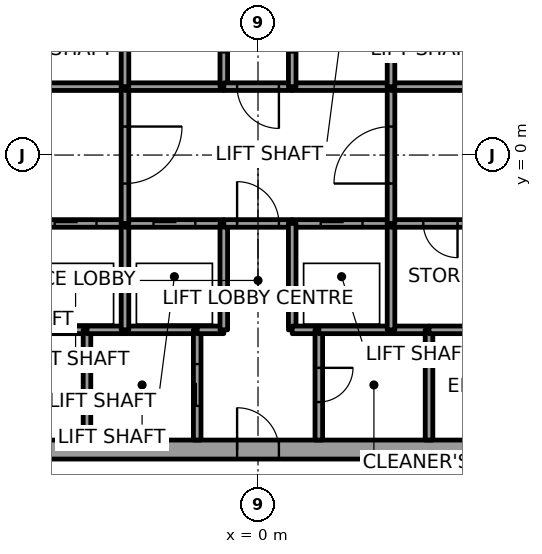
"""IFC4 building model, lengths in metres.
Left out: names, types, materials, properties, quantities, classifications, styles, units other than length and angle.
Written with IfcOpenShell. Run it as: python <this file> out.ifc"""

import sys

from ifc_helpers import new_model, si_unit, direction, frame, frame_2d, origin, place, context, subcontext, project, spatial, rectangle, extrude, element, fill, save


model = new_model("IFC4")
c1 = context("Model", 3, precision=1e-05, world=origin(), true_north=direction((0.0, 1.0)))
c2 = subcontext(c1, "Body", "Model", "MODEL_VIEW")
j1 = project(units=[si_unit("LENGTHUNIT", "METRE"), si_unit("PLANEANGLEUNIT", "RADIAN")], contexts=[c1])
p1 = place(None, origin())
s1 = spatial("IfcSite", under=j1, at=p1, CompositionType="ELEMENT")
p2 = place(p1, origin())
s2 = spatial("IfcBuilding", under=s1, at=p2, CompositionType="ELEMENT")
p3 = place(p2, frame((0.0, 0.0, 22.2)))
s3 = spatial("IfcBuildingStorey", under=s2, at=p3, CompositionType="ELEMENT", Elevation=22.2)
p4 = place(p3, frame((-11.0, -7.75, 0.0), z_axis=(0.0, 0.0, 1.0), x_axis=(1.0, 0.0, 0.0)))
e1 = element("IfcWall", 1, at=p4, inside=s3, PredefinedType="SHEAR", context=c2, shape_type="SweptSolid", body=[
    extrude(rectangle(XDim=22.0, YDim=0.5, at=frame_2d((11.0, 0.0))), origin(), (0.0, 0.0, 1.0), 6.6),
])
p5 = place(p4, frame((10.45, 0.0, 0.0)))
e2 = element("IfcOpeningElement", 2, at=p5, cuts=e1, PredefinedType="OPENING", context=c2, shape_type="SweptSolid", body=[
    extrude(rectangle(XDim=1.1, YDim=2.1, at=frame_2d((0.55, 1.05))), frame((0.0, 0.25, 0.0), z_axis=(0.0, -1.0, 0.0), x_axis=(1.0, 0.0, 0.0)), (0.0, 0.0, 1.0), 0.5),
])
p6 = place(p3, frame((-6.1, -4.6, 0.0), z_axis=(0.0, 0.0, 1.0), x_axis=(1.0, 0.0, 0.0)))
e3 = element("IfcWall", 3, at=p6, inside=s3, PredefinedType="SOLIDWALL", context=c2, shape_type="SweptSolid", body=[
    extrude(rectangle(XDim=1.6, YDim=0.2, at=frame_2d((0.8, 0.0))), origin(), (0.0, 0.0, 1.0), 6.35),
])
p7 = place(p3, frame((-6.1, -1.8, 0.0), z_axis=(0.0, 0.0, 1.0), x_axis=(1.0, 0.0, 0.0)))
e4 = element("IfcWall", 4, at=p7, inside=s3, PredefinedType="SOLIDWALL", context=c2, shape_type="SweptSolid", body=[
    extrude(rectangle(XDim=2.6, YDim=0.2, at=frame_2d((1.3, 0.0))), origin(), (0.0, 0.0, 1.0), 6.35),
])
p8 = place(p7, frame((0.75, 0.0, 0.0)))
e5 = element("IfcOpeningElement", 5, at=p8, cuts=e4, PredefinedType="OPENING", context=c2, shape_type="SweptSolid", body=[
    extrude(rectangle(XDim=1.1, YDim=2.1, at=frame_2d((0.55, 1.05))), frame((0.0, 0.1, 0.0), z_axis=(0.0, -1.0, 0.0), x_axis=(1.0, 0.0, 0.0)), (0.0, 0.0, 1.0), 0.2),
])
p9 = place(p3, frame((-3.5, 1.8, 0.0), z_axis=(0.0, 0.0, 1.0), x_axis=(-1.0, 0.0, 0.0)))
e6 = element("IfcWall", 6, at=p9, inside=s3, PredefinedType="SOLIDWALL", context=c2, shape_type="SweptSolid", body=[
    extrude(rectangle(XDim=2.6, YDim=0.2, at=frame_2d((1.3, 0.0))), origin(), (0.0, 0.0, 1.0), 6.35),
])
p10 = place(p3, frame((-4.5, -4.6, 0.0), z_axis=(0.0, 0.0, 1.0), x_axis=(0.0, -1.0, 0.0)))
e7 = element("IfcWall", 7, at=p10, inside=s3, PredefinedType="SOLIDWALL", context=c2, shape_type="SweptSolid", body=[
    extrude(rectangle(XDim=2.9, YDim=0.2, at=frame_2d((1.45, 0.0))), origin(), (0.0, 0.0, 1.0), 6.35),
])
p11 = place(p3, frame((-4.5, -4.6, 0.0), z_axis=(0.0, 0.0, 1.0), x_axis=(1.0, 0.0, 0.0)))
e8 = element("IfcWall", 8, at=p11, inside=s3, PredefinedType="SOLIDWALL", context=c2, shape_type="SweptSolid", body=[
    extrude(rectangle(XDim=1.0, YDim=0.2, at=frame_2d((0.5, 0.0))), origin(), (0.0, 0.0, 1.0), 6.35),
])
p12 = place(p3, frame((-3.5, -4.6, 0.0), z_axis=(0.0, 0.0, 1.0), x_axis=(1.0, 0.0, 0.0)))
e9 = element("IfcWall", 9, at=p12, inside=s3, PredefinedType="SOLIDWALL", context=c2, shape_type="SweptSolid", body=[
    extrude(rectangle(XDim=1.9, YDim=0.2, at=frame_2d((0.95, 0.0))), origin(), (0.0, 0.0, 1.0), 6.35),
])
p13 = place(p3, frame((-3.5, -4.6, 0.0), z_axis=(0.0, 0.0, 1.0), x_axis=(0.0, 1.0, 0.0)))
e10 = element("IfcWall", 10, at=p13, inside=s3, PredefinedType="SOLIDWALL", context=c2, shape_type="SweptSolid", body=[
    extrude(rectangle(XDim=2.8, YDim=0.2, at=frame_2d((1.4, 0.0))), origin(), (0.0, 0.0, 1.0), 6.35),
])
p14 = place(p3, frame((-3.5, -1.8, 0.0), z_axis=(0.0, 0.0, 1.0), x_axis=(1.0, 0.0, 0.0)))
e11 = element("IfcWall", 11, at=p14, inside=s3, PredefinedType="SOLIDWALL", context=c2, shape_type="SweptSolid", body=[
    extrude(rectangle(XDim=2.6, YDim=0.2, at=frame_2d((1.3, 0.0))), origin(), (0.0, 0.0, 1.0), 6.35),
])
p15 = place(p14, frame((0.75, 0.0, 0.0)))
e12 = element("IfcOpeningElement", 12, at=p15, cuts=e11, PredefinedType="OPENING", context=c2, shape_type="SweptSolid", body=[
    extrude(rectangle(XDim=1.1, YDim=2.1, at=frame_2d((0.55, 1.05))), frame((0.0, 0.1, 0.0), z_axis=(0.0, -1.0, 0.0), x_axis=(1.0, 0.0, 0.0)), (0.0, 0.0, 1.0), 0.2),
])
p16 = place(p3, frame((-3.5, 1.8, 0.0), z_axis=(0.0, 0.0, 1.0), x_axis=(0.0, -1.0, 0.0)))
e13 = element("IfcWall", 13, at=p16, inside=s3, PredefinedType="SOLIDWALL", context=c2, shape_type="SweptSolid", body=[
    extrude(rectangle(XDim=3.6, YDim=0.2, at=frame_2d((1.8, 0.0))), origin(), (0.0, 0.0, 1.0), 6.35),
])
p17 = place(p16, frame((1.05, 0.0, 0.0)))
e14 = element("IfcOpeningElement", 14, at=p17, cuts=e13, PredefinedType="OPENING", context=c2, shape_type="SweptSolid", body=[
    extrude(rectangle(XDim=1.5, YDim=2.4, at=frame_2d((0.75, 1.2))), frame((0.0, 0.1, 0.0), z_axis=(0.0, -1.0, 0.0), x_axis=(1.0, 0.0, 0.0)), (0.0, 0.0, 1.0), 0.2),
])
p18 = place(p3, frame((-0.9, 1.8, 0.0), z_axis=(0.0, 0.0, 1.0), x_axis=(-1.0, 0.0, 0.0)))
e15 = element("IfcWall", 15, at=p18, inside=s3, PredefinedType="SOLIDWALL", context=c2, shape_type="SweptSolid", body=[
    extrude(rectangle(XDim=2.6, YDim=0.2, at=frame_2d((1.3, 0.0))), origin(), (0.0, 0.0, 1.0), 6.35),
])
p19 = place(p3, frame((-3.5, 4.6, 0.0), z_axis=(0.0, 0.0, 1.0), x_axis=(0.0, -1.0, 0.0)))
e16 = element("IfcWall", 16, at=p19, inside=s3, PredefinedType="SOLIDWALL", context=c2, shape_type="SweptSolid", body=[
    extrude(rectangle(XDim=2.8, YDim=0.2, at=frame_2d((1.4, 0.0))), origin(), (0.0, 0.0, 1.0), 6.35),
])
p20 = place(p3, frame((-0.9, 1.8, 0.0), z_axis=(0.0, 0.0, 1.0), x_axis=(0.0, 1.0, 0.0)))
e17 = element("IfcWall", 17, at=p20, inside=s3, PredefinedType="SOLIDWALL", context=c2, shape_type="SweptSolid", body=[
    extrude(rectangle(XDim=3.0, YDim=0.2, at=frame_2d((1.5, 0.0))), origin(), (0.0, 0.0, 1.0), 6.35),
])
p21 = place(p20, frame((0.9, 0.0, 0.0)))
e18 = element("IfcOpeningElement", 18, at=p21, cuts=e17, PredefinedType="OPENING", context=c2, shape_type="SweptSolid", body=[
    extrude(rectangle(XDim=1.2, YDim=2.1, at=frame_2d((0.6, 1.05))), frame((0.0, 0.1, 0.0), z_axis=(0.0, -1.0, 0.0), x_axis=(1.0, 0.0, 0.0)), (0.0, 0.0, 1.0), 0.2),
])
p22 = place(p3, frame((-1.6, -7.5, 0.0), z_axis=(0.0, 0.0, 1.0), x_axis=(0.0, 1.0, 0.0)))
e19 = element("IfcWall", 19, at=p22, inside=s3, PredefinedType="SOLIDWALL", context=c2, shape_type="SweptSolid", body=[
    extrude(rectangle(XDim=2.9, YDim=0.2, at=frame_2d((1.45, 0.0))), origin(), (0.0, 0.0, 1.0), 6.35),
])
p23 = place(p22, frame((0.9, 0.0, 0.0)))
e20 = element("IfcOpeningElement", 20, at=p23, cuts=e19, PredefinedType="OPENING", context=c2, shape_type="SweptSolid", body=[
    extrude(rectangle(XDim=1.1, YDim=2.1, at=frame_2d((0.55, 1.05))), frame((0.0, 0.1, 0.0), z_axis=(0.0, -1.0, 0.0), x_axis=(1.0, 0.0, 0.0)), (0.0, 0.0, 1.0), 0.2),
])
p24 = place(p3, frame((-1.6, -4.6, 0.0), z_axis=(0.0, 0.0, 1.0), x_axis=(1.0, 0.0, 0.0)))
e21 = element("IfcWall", 21, at=p24, inside=s3, PredefinedType="SOLIDWALL", context=c2, shape_type="SweptSolid", body=[
    extrude(rectangle(XDim=0.7, YDim=0.2, at=frame_2d((0.35, 0.0))), origin(), (0.0, 0.0, 1.0), 6.35),
])
p25 = place(p3, frame((-0.9, -4.6, 0.0), z_axis=(0.0, 0.0, 1.0), x_axis=(0.0, 1.0, 0.0)))
e22 = element("IfcWall", 22, at=p25, inside=s3, PredefinedType="SOLIDWALL", context=c2, shape_type="SweptSolid", body=[
    extrude(rectangle(XDim=2.8, YDim=0.2, at=frame_2d((1.4, 0.0))), origin(), (0.0, 0.0, 1.0), 6.35),
])
p26 = place(p3, frame((-0.9, -1.8, 0.0), z_axis=(0.0, 0.0, 1.0), x_axis=(1.0, 0.0, 0.0)))
e23 = element("IfcWall", 23, at=p26, inside=s3, PredefinedType="SOLIDWALL", context=c2, shape_type="SweptSolid", body=[
    extrude(rectangle(XDim=1.8, YDim=0.2, at=frame_2d((0.9, 0.0))), origin(), (0.0, 0.0, 1.0), 6.35),
])
p27 = place(p26, frame((0.35, 0.0, 0.0)))
e24 = element("IfcOpeningElement", 24, at=p27, cuts=e23, PredefinedType="OPENING", context=c2, shape_type="SweptSolid", body=[
    extrude(rectangle(XDim=1.1, YDim=2.4, at=frame_2d((0.55, 1.2))), frame((0.0, 0.1, 0.0), z_axis=(0.0, -1.0, 0.0), x_axis=(1.0, 0.0, 0.0)), (0.0, 0.0, 1.0), 0.2),
])
p28 = place(p3, frame((0.9, 1.8, 0.0), z_axis=(0.0, 0.0, 1.0), x_axis=(-1.0, 0.0, 0.0)))
e25 = element("IfcWall", 25, at=p28, inside=s3, PredefinedType="SOLIDWALL", context=c2, shape_type="SweptSolid", body=[
    extrude(rectangle(XDim=1.8, YDim=0.2, at=frame_2d((0.9, 0.0))), origin(), (0.0, 0.0, 1.0), 6.35),
])
p29 = place(p28, frame((0.35, 0.0, 0.0)))
e26 = element("IfcOpeningElement", 26, at=p29, cuts=e25, PredefinedType="OPENING", context=c2, shape_type="SweptSolid", body=[
    extrude(rectangle(XDim=1.1, YDim=2.4, at=frame_2d((0.55, 1.2))), frame((0.0, 0.1, 0.0), z_axis=(0.0, -1.0, 0.0), x_axis=(1.0, 0.0, 0.0)), (0.0, 0.0, 1.0), 0.2),
])
p30 = place(p3, frame((0.9, -1.8, 0.0), z_axis=(0.0, 0.0, 1.0), x_axis=(1.0, 0.0, 0.0)))
e27 = element("IfcWall", 27, at=p30, inside=s3, PredefinedType="SOLIDWALL", context=c2, shape_type="SweptSolid", body=[
    extrude(rectangle(XDim=2.6, YDim=0.2, at=frame_2d((1.3, 0.0))), origin(), (0.0, 0.0, 1.0), 6.35),
])
p31 = place(p30, frame((0.75, 0.0, 0.0)))
e28 = element("IfcOpeningElement", 28, at=p31, cuts=e27, PredefinedType="OPENING", context=c2, shape_type="SweptSolid", body=[
    extrude(rectangle(XDim=1.1, YDim=2.1, at=frame_2d((0.55, 1.05))), frame((0.0, 0.1, 0.0), z_axis=(0.0, -1.0, 0.0), x_axis=(1.0, 0.0, 0.0)), (0.0, 0.0, 1.0), 0.2),
])
p32 = place(p3, frame((0.9, -1.8, 0.0), z_axis=(0.0, 0.0, 1.0), x_axis=(0.0, -1.0, 0.0)))
e29 = element("IfcWall", 29, at=p32, inside=s3, PredefinedType="SOLIDWALL", context=c2, shape_type="SweptSolid", body=[
    extrude(rectangle(XDim=2.8, YDim=0.2, at=frame_2d((1.4, 0.0))), origin(), (0.0, 0.0, 1.0), 6.35),
])
p33 = place(p3, frame((0.9, -4.6, 0.0), z_axis=(0.0, 0.0, 1.0), x_axis=(1.0, 0.0, 0.0)))
e30 = element("IfcWall", 30, at=p33, inside=s3, PredefinedType="SOLIDWALL", context=c2, shape_type="SweptSolid", body=[
    extrude(rectangle(XDim=0.7, YDim=0.2, at=frame_2d((0.35, 0.0))), origin(), (0.0, 0.0, 1.0), 6.35),
])
p34 = place(p3, frame((3.5, 1.8, 0.0), z_axis=(0.0, 0.0, 1.0), x_axis=(-1.0, 0.0, 0.0)))
e31 = element("IfcWall", 31, at=p34, inside=s3, PredefinedType="SOLIDWALL", context=c2, shape_type="SweptSolid", body=[
    extrude(rectangle(XDim=2.6, YDim=0.2, at=frame_2d((1.3, 0.0))), origin(), (0.0, 0.0, 1.0), 6.35),
])
p35 = place(p3, frame((0.9, 4.8, 0.0), z_axis=(0.0, 0.0, 1.0), x_axis=(0.0, -1.0, 0.0)))
e32 = element("IfcWall", 32, at=p35, inside=s3, PredefinedType="SOLIDWALL", context=c2, shape_type="SweptSolid", body=[
    extrude(rectangle(XDim=3.0, YDim=0.2, at=frame_2d((1.5, 0.0))), origin(), (0.0, 0.0, 1.0), 6.35),
])
p36 = place(p35, frame((0.9, 0.0, 0.0)))
e33 = element("IfcOpeningElement", 33, at=p36, cuts=e32, PredefinedType="OPENING", context=c2, shape_type="SweptSolid", body=[
    extrude(rectangle(XDim=1.2, YDim=2.1, at=frame_2d((0.6, 1.05))), frame((0.0, 0.1, 0.0), z_axis=(0.0, -1.0, 0.0), x_axis=(1.0, 0.0, 0.0)), (0.0, 0.0, 1.0), 0.2),
])
p37 = place(p3, frame((1.6, -4.6, 0.0), z_axis=(0.0, 0.0, 1.0), x_axis=(0.0, -1.0, 0.0)))
e34 = element("IfcWall", 34, at=p37, inside=s3, PredefinedType="SOLIDWALL", context=c2, shape_type="SweptSolid", body=[
    extrude(rectangle(XDim=2.9, YDim=0.2, at=frame_2d((1.45, 0.0))), origin(), (0.0, 0.0, 1.0), 6.35),
])
p38 = place(p37, frame((1.0, 0.0, 0.0)))
e35 = element("IfcOpeningElement", 35, at=p38, cuts=e34, PredefinedType="OPENING", context=c2, shape_type="SweptSolid", body=[
    extrude(rectangle(XDim=0.9, YDim=2.4, at=frame_2d((0.45, 1.2))), frame((0.0, 0.1, 0.0), z_axis=(0.0, -1.0, 0.0), x_axis=(1.0, 0.0, 0.0)), (0.0, 0.0, 1.0), 0.2),
])
p39 = place(p3, frame((3.5, -4.6, 0.0), z_axis=(0.0, 0.0, 1.0), x_axis=(-1.0, 0.0, 0.0)))
e36 = element("IfcWall", 36, at=p39, inside=s3, PredefinedType="SOLIDWALL", context=c2, shape_type="SweptSolid", body=[
    extrude(rectangle(XDim=1.9, YDim=0.2, at=frame_2d((0.95, 0.0))), origin(), (0.0, 0.0, 1.0), 6.35),
])
p40 = place(p3, frame((3.5, -4.6, 0.0), z_axis=(0.0, 0.0, 1.0), x_axis=(1.0, 0.0, 0.0)))
e37 = element("IfcWall", 37, at=p40, inside=s3, PredefinedType="SOLIDWALL", context=c2, shape_type="SweptSolid", body=[
    extrude(rectangle(XDim=1.0, YDim=0.2, at=frame_2d((0.5, 0.0))), origin(), (0.0, 0.0, 1.0), 6.35),
])
p41 = place(p3, frame((3.5, -1.8, 0.0), z_axis=(0.0, 0.0, 1.0), x_axis=(0.0, -1.0, 0.0)))
e38 = element("IfcWall", 38, at=p41, inside=s3, PredefinedType="SOLIDWALL", context=c2, shape_type="SweptSolid", body=[
    extrude(rectangle(XDim=2.8, YDim=0.2, at=frame_2d((1.4, 0.0))), origin(), (0.0, 0.0, 1.0), 6.35),
])
p42 = place(p3, frame((6.1, -1.8, 0.0), z_axis=(0.0, 0.0, 1.0), x_axis=(-1.0, 0.0, 0.0)))
e39 = element("IfcWall", 39, at=p42, inside=s3, PredefinedType="SOLIDWALL", context=c2, shape_type="SweptSolid", body=[
    extrude(rectangle(XDim=2.6, YDim=0.2, at=frame_2d((1.3, 0.0))), origin(), (0.0, 0.0, 1.0), 6.35),
])
p43 = place(p42, frame((0.85, 0.0, 0.0)))
e40 = element("IfcOpeningElement", 40, at=p43, cuts=e39, PredefinedType="OPENING", context=c2, shape_type="SweptSolid", body=[
    extrude(rectangle(XDim=0.9, YDim=2.4, at=frame_2d((0.45, 1.2))), frame((0.0, 0.1, 0.0), z_axis=(0.0, -1.0, 0.0), x_axis=(1.0, 0.0, 0.0)), (0.0, 0.0, 1.0), 0.2),
])
p44 = place(p3, frame((3.5, -1.8, 0.0), z_axis=(0.0, 0.0, 1.0), x_axis=(0.0, 1.0, 0.0)))
e41 = element("IfcWall", 41, at=p44, inside=s3, PredefinedType="SOLIDWALL", context=c2, shape_type="SweptSolid", body=[
    extrude(rectangle(XDim=3.6, YDim=0.2, at=frame_2d((1.8, 0.0))), origin(), (0.0, 0.0, 1.0), 6.35),
])
p45 = place(p44, frame((1.05, 0.0, 0.0)))
e42 = element("IfcOpeningElement", 42, at=p45, cuts=e41, PredefinedType="OPENING", context=c2, shape_type="SweptSolid", body=[
    extrude(rectangle(XDim=1.5, YDim=2.4, at=frame_2d((0.75, 1.2))), frame((0.0, 0.1, 0.0), z_axis=(0.0, -1.0, 0.0), x_axis=(1.0, 0.0, 0.0)), (0.0, 0.0, 1.0), 0.2),
])
p46 = place(p3, frame((6.1, 1.8, 0.0), z_axis=(0.0, 0.0, 1.0), x_axis=(-1.0, 0.0, 0.0)))
e43 = element("IfcWall", 43, at=p46, inside=s3, PredefinedType="SOLIDWALL", context=c2, shape_type="SweptSolid", body=[
    extrude(rectangle(XDim=2.6, YDim=0.2, at=frame_2d((1.3, 0.0))), origin(), (0.0, 0.0, 1.0), 6.35),
])
p47 = place(p3, frame((3.5, 1.8, 0.0), z_axis=(0.0, 0.0, 1.0), x_axis=(0.0, 1.0, 0.0)))
e44 = element("IfcWall", 44, at=p47, inside=s3, PredefinedType="SOLIDWALL", context=c2, shape_type="SweptSolid", body=[
    extrude(rectangle(XDim=2.8, YDim=0.2, at=frame_2d((1.4, 0.0))), origin(), (0.0, 0.0, 1.0), 6.35),
])
p48 = place(p3, frame((4.5, -7.5, 0.0), z_axis=(0.0, 0.0, 1.0), x_axis=(0.0, 1.0, 0.0)))
e45 = element("IfcWall", 45, at=p48, inside=s3, PredefinedType="SOLIDWALL", context=c2, shape_type="SweptSolid", body=[
    extrude(rectangle(XDim=2.9, YDim=0.2, at=frame_2d((1.45, 0.0))), origin(), (0.0, 0.0, 1.0), 6.35),
])
p49 = place(p3, frame((4.5, -4.6, 0.0), z_axis=(0.0, 0.0, 1.0), x_axis=(1.0, 0.0, 0.0)))
e46 = element("IfcWall", 46, at=p49, inside=s3, PredefinedType="SOLIDWALL", context=c2, shape_type="SweptSolid", body=[
    extrude(rectangle(XDim=1.6, YDim=0.2, at=frame_2d((0.8, 0.0))), origin(), (0.0, 0.0, 1.0), 6.35),
])
p50 = place(p8, origin())
e47 = element("IfcDoor", 47, at=p50, inside=s3, OperationType="SLIDING_TO_RIGHT", PredefinedType="DOOR", context=c2, shape_type="SweptSolid", body=[
    extrude(rectangle(XDim=1.1, YDim=2.1, at=frame_2d((0.55, 1.05))), frame((0.0, 0.025, 0.0), z_axis=(0.0, -1.0, 0.0), x_axis=(1.0, 0.0, 0.0)), (0.0, 0.0, 1.0), 0.05),
])
fill(e5, e47)
p51 = place(p15, origin())
e48 = element("IfcDoor", 48, at=p51, inside=s3, OperationType="SLIDING_TO_RIGHT", PredefinedType="DOOR", context=c2, shape_type="SweptSolid", body=[
    extrude(rectangle(XDim=1.1, YDim=2.1, at=frame_2d((0.55, 1.05))), frame((0.0, 0.025, 0.0), z_axis=(0.0, -1.0, 0.0), x_axis=(1.0, 0.0, 0.0)), (0.0, 0.0, 1.0), 0.05),
])
fill(e12, e48)
p52 = place(p31, origin())
e49 = element("IfcDoor", 49, at=p52, inside=s3, OperationType="SLIDING_TO_LEFT", PredefinedType="DOOR", context=c2, shape_type="SweptSolid", body=[
    extrude(rectangle(XDim=1.1, YDim=2.1, at=frame_2d((0.55, 1.05))), frame((0.0, 0.025, 0.0), z_axis=(0.0, -1.0, 0.0), x_axis=(1.0, 0.0, 0.0)), (0.0, 0.0, 1.0), 0.05),
])
fill(e28, e49)
p53 = place(p23, origin())
e50 = element("IfcDoor", 50, at=p53, inside=s3, OperationType="SLIDING_TO_RIGHT", PredefinedType="DOOR", context=c2, shape_type="SweptSolid", body=[
    extrude(rectangle(XDim=1.1, YDim=2.1, at=frame_2d((0.55, 1.05))), frame((0.0, 0.025, 0.0), z_axis=(0.0, -1.0, 0.0), x_axis=(1.0, 0.0, 0.0)), (0.0, 0.0, 1.0), 0.05),
])
fill(e20, e50)
p54 = place(p17, origin())
e51 = element("IfcDoor", 51, at=p54, inside=s3, OperationType="DOUBLE_DOOR_SINGLE_SWING", PredefinedType="DOOR", context=c2, shape_type="SweptSolid", body=[
    extrude(rectangle(XDim=1.5, YDim=2.4, at=frame_2d((0.75, 1.2))), frame((0.0, 0.025, 0.0), z_axis=(0.0, -1.0, 0.0), x_axis=(1.0, 0.0, 0.0)), (0.0, 0.0, 1.0), 0.05),
])
fill(e14, e51)
p55 = place(p45, origin())
e52 = element("IfcDoor", 52, at=p55, inside=s3, OperationType="DOUBLE_DOOR_SINGLE_SWING", PredefinedType="DOOR", context=c2, shape_type="SweptSolid", body=[
    extrude(rectangle(XDim=1.5, YDim=2.4, at=frame_2d((0.75, 1.2))), frame((0.0, 0.025, 0.0), z_axis=(0.0, -1.0, 0.0), x_axis=(1.0, 0.0, 0.0)), (0.0, 0.0, 1.0), 0.05),
])
fill(e42, e52)
p56 = place(p29, origin())
e53 = element("IfcDoor", 53, at=p56, inside=s3, OperationType="SINGLE_SWING_LEFT", PredefinedType="DOOR", context=c2, shape_type="SweptSolid", body=[
    extrude(rectangle(XDim=1.1, YDim=2.4, at=frame_2d((0.55, 1.2))), frame((0.0, 0.025, 0.0), z_axis=(0.0, -1.0, 0.0), x_axis=(1.0, 0.0, 0.0)), (0.0, 0.0, 1.0), 0.05),
])
fill(e26, e53)
p57 = place(p27, origin())
e54 = element("IfcDoor", 54, at=p57, inside=s3, OperationType="SINGLE_SWING_RIGHT", PredefinedType="DOOR", context=c2, shape_type="SweptSolid", body=[
    extrude(rectangle(XDim=1.1, YDim=2.4, at=frame_2d((0.55, 1.2))), frame((0.0, 0.025, 0.0), z_axis=(0.0, -1.0, 0.0), x_axis=(1.0, 0.0, 0.0)), (0.0, 0.0, 1.0), 0.05),
])
fill(e24, e54)
p58 = place(p43, origin())
e55 = element("IfcDoor", 55, at=p58, inside=s3, OperationType="SINGLE_SWING_LEFT", PredefinedType="DOOR", context=c2, shape_type="SweptSolid", body=[
    extrude(rectangle(XDim=0.9, YDim=2.4, at=frame_2d((0.45, 1.2))), frame((0.0, 0.025, 0.0), z_axis=(0.0, -1.0, 0.0), x_axis=(1.0, 0.0, 0.0)), (0.0, 0.0, 1.0), 0.05),
])
fill(e40, e55)
p59 = place(p38, origin())
e56 = element("IfcDoor", 56, at=p59, inside=s3, OperationType="SINGLE_SWING_LEFT", PredefinedType="DOOR", context=c2, shape_type="SweptSolid", body=[
    extrude(rectangle(XDim=0.9, YDim=2.4, at=frame_2d((0.45, 1.2))), frame((0.0, 0.025, 0.0), z_axis=(0.0, -1.0, 0.0), x_axis=(1.0, 0.0, 0.0)), (0.0, 0.0, 1.0), 0.05),
])
fill(e35, e56)
p60 = place(p5, origin())
e57 = element("IfcDoor", 57, at=p60, inside=s3, OperationType="SINGLE_SWING_LEFT", PredefinedType="DOOR", context=c2, shape_type="SweptSolid", body=[
    extrude(rectangle(XDim=1.1, YDim=2.1, at=frame_2d((0.55, 1.05))), frame((0.0, 0.025, 0.0), z_axis=(0.0, -1.0, 0.0), x_axis=(1.0, 0.0, 0.0)), (0.0, 0.0, 1.0), 0.05),
])
fill(e2, e57)
save(model, sys.argv[1])
